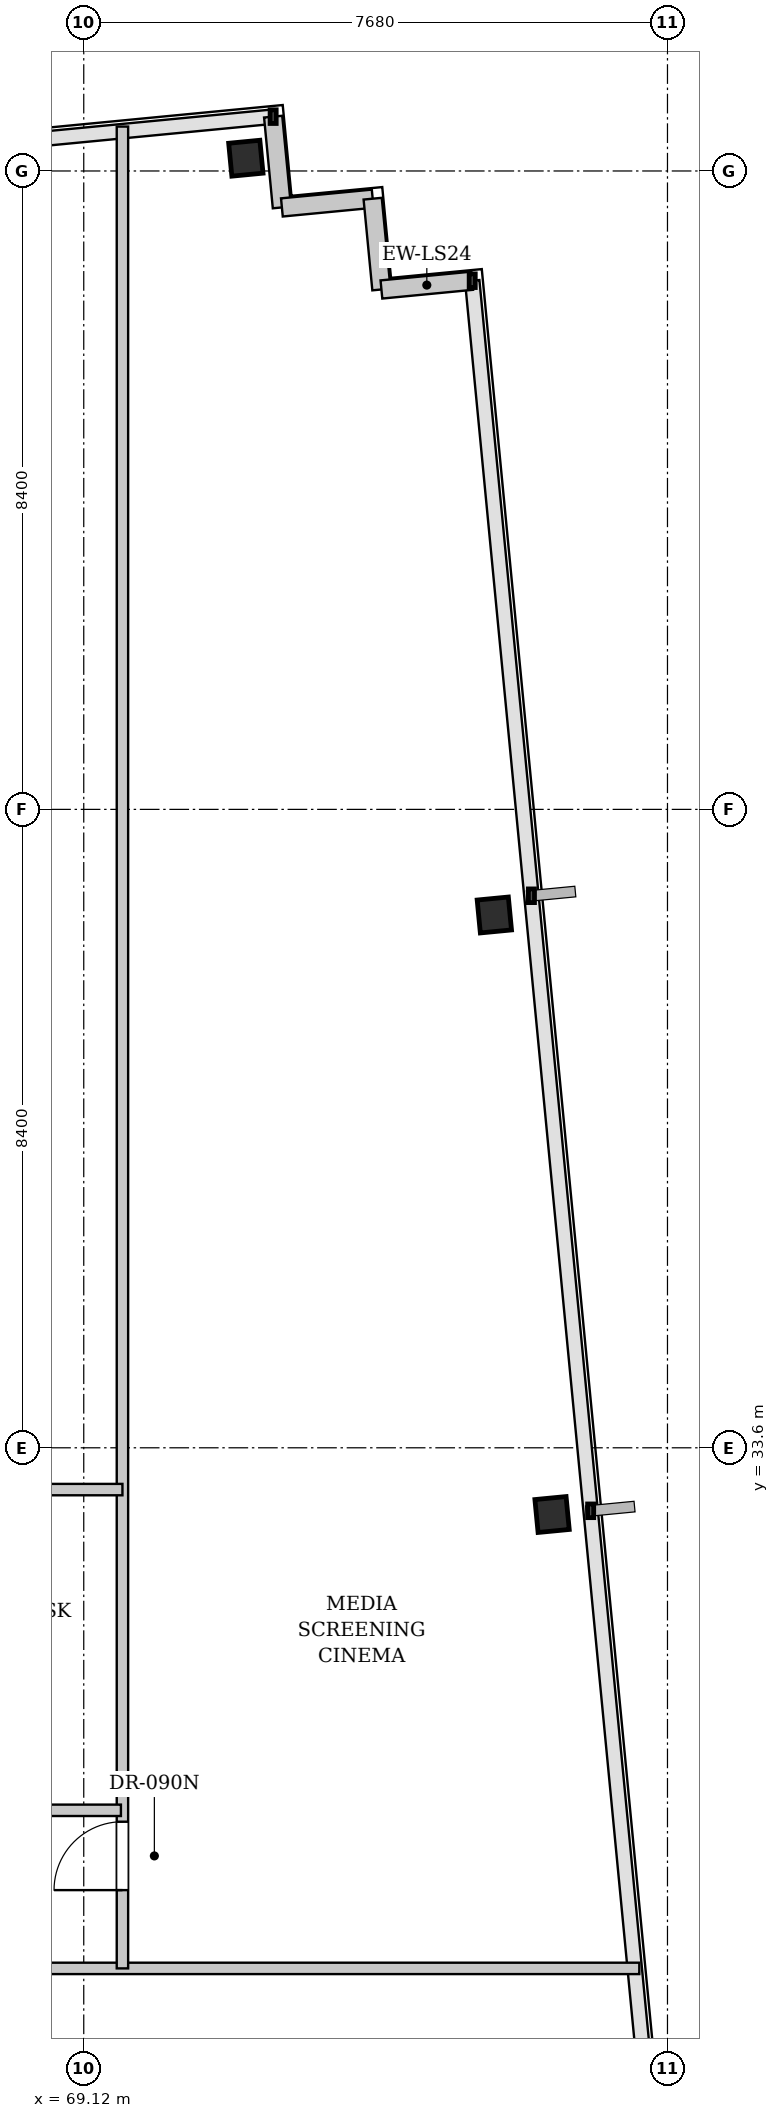
"""IFC4 building model, lengths in metres.
Left out: names, types, materials, properties, quantities, classifications, styles, units other than length and angle.
Written with IfcOpenShell. Run it as: python <this file> out.ifc"""

import sys

from ifc_helpers import new_model, si_unit, direction, frame, frame_2d, origin, origin_2d, place, context, subcontext, project, spatial, rectangle, i_section, extrude, element, fill, save


model = new_model("IFC4")
c1 = context("Model", 3, precision=1e-05, world=origin(), true_north=direction((0.0, 1.0)))
c2 = subcontext(c1, "Body", "Model", "MODEL_VIEW")
j1 = project(units=[si_unit("LENGTHUNIT", "METRE"), si_unit("PLANEANGLEUNIT", "RADIAN")], contexts=[c1])
p1 = place(None, origin())
s1 = spatial("IfcSite", under=j1, at=p1, CompositionType="ELEMENT")
p2 = place(p1, origin())
s2 = spatial("IfcBuilding", under=s1, at=p2, CompositionType="ELEMENT")
p3 = place(p2, frame((0.0, 0.0, 106.7)))
s3 = spatial("IfcBuildingStorey", under=s2, at=p3, CompositionType="ELEMENT", Elevation=106.7)
for number, where, z_axis, x_axis in (
    (1, (71.253, 50.568, 0.0), (0.0, 0.0, 1.0), (0.995, 0.096, 0.0)),
    (2, (75.282, 32.722, 0.0), (0.0, 0.0, 1.0), (0.995, 0.096, 0.0)),
    (3, (74.522, 40.611, 0.0), (0.0, 0.0, 1.0), (0.995, 0.096, 0.0)),
):
    element("IfcColumn", number, at=place(p3, frame(where, z_axis=z_axis, x_axis=x_axis)), inside=s3, PredefinedType="COLUMN", context=c2, shape_type="SweptSolid", body=[
        extrude(i_section(OverallWidth=0.412, OverallDepth=0.435, WebThickness=0.036, FlangeThickness=0.058, FilletRadius=0.015, at=origin_2d()), origin(), (0.0, 0.0, 1.0), 3.4),
    ])
for number, where, z_axis, x_axis in (
    (4, (71.612, 51.115, 0.0), (0.0, 0.0, 1.0), (0.096, -0.995, 0.0)),
    (5, (71.727, 49.92, 0.0), (0.0, 0.0, 1.0), (0.995, 0.096, 0.0)),
    (6, (72.921, 50.035, 0.0), (0.0, 0.0, 1.0), (0.096, -0.995, 0.0)),
    (7, (73.036, 48.841, 0.0), (0.0, 0.0, 1.0), (0.995, 0.096, 0.0)),
):
    element("IfcWall", number, at=place(p3, frame(where, z_axis=z_axis, x_axis=x_axis)), inside=s3, PredefinedType="SOLIDWALL", context=c2, shape_type="SweptSolid", body=[
        extrude(rectangle(XDim=1.2, YDim=0.24, at=frame_2d((0.6, 0.0))), origin(), (0.0, 0.0, 1.0), 3.18),
    ])
p4 = place(p3, frame((15.208, 26.75, 0.0), z_axis=(0.0, 0.0, 1.0), x_axis=(1.0, 0.0, 0.0)))
e8 = element("IfcWall", 8, at=p4, inside=s3, PredefinedType="PARTITIONING", context=c2, shape_type="SweptSolid", body=[
    extrude(rectangle(XDim=61.222, YDim=0.15, at=frame_2d((30.611, 0.0))), origin(), (0.0, 0.0, 1.0), 2.525),
])
p5 = place(p4, frame((9.474, 0.0, 0.0)))
e9 = element("IfcOpeningElement", 9, at=p5, cuts=e8, PredefinedType="OPENING", context=c2, shape_type="SweptSolid", body=[
    extrude(rectangle(XDim=1.0, YDim=2.15, at=frame_2d((0.5, 1.075))), frame((0.0, 0.085, 0.0), z_axis=(0.0, -1.0, 0.0), x_axis=(1.0, 0.0, 0.0)), (0.0, 0.0, 1.0), 0.17),
])
p6 = place(p4, frame((17.351, 0.0, 0.0)))
e10 = element("IfcOpeningElement", 10, at=p6, cuts=e8, PredefinedType="OPENING", context=c2, shape_type="SweptSolid", body=[
    extrude(rectangle(XDim=1.0, YDim=2.15, at=frame_2d((0.5, 1.075))), frame((0.0, 0.085, 0.0), z_axis=(0.0, -1.0, 0.0), x_axis=(1.0, 0.0, 0.0)), (0.0, 0.0, 1.0), 0.17),
])
p7 = place(p4, frame((24.736, 0.0, 0.0)))
e11 = element("IfcOpeningElement", 11, at=p7, cuts=e8, PredefinedType="OPENING", context=c2, shape_type="SweptSolid", body=[
    extrude(rectangle(XDim=1.0, YDim=2.15, at=frame_2d((0.5, 1.075))), frame((0.0, 0.085, 0.0), z_axis=(0.0, -1.0, 0.0), x_axis=(1.0, 0.0, 0.0)), (0.0, 0.0, 1.0), 0.17),
])
p8 = place(p4, frame((32.429, 0.0, 0.0)))
e12 = element("IfcOpeningElement", 12, at=p8, cuts=e8, PredefinedType="OPENING", context=c2, shape_type="SweptSolid", body=[
    extrude(rectangle(XDim=1.0, YDim=2.15, at=frame_2d((0.5, 1.075))), frame((0.0, 0.085, 0.0), z_axis=(0.0, -1.0, 0.0), x_axis=(1.0, 0.0, 0.0)), (0.0, 0.0, 1.0), 0.17),
])
p9 = place(p4, frame((35.993, 0.0, 0.0)))
e13 = element("IfcOpeningElement", 13, at=p9, cuts=e8, PredefinedType="OPENING", context=c2, shape_type="SweptSolid", body=[
    extrude(rectangle(XDim=1.0, YDim=2.15, at=frame_2d((0.5, 1.075))), frame((0.0, 0.085, 0.0), z_axis=(0.0, -1.0, 0.0), x_axis=(1.0, 0.0, 0.0)), (0.0, 0.0, 1.0), 0.17),
])
p10 = place(p4, frame((43.982, 0.0, 0.0)))
e14 = element("IfcOpeningElement", 14, at=p10, cuts=e8, PredefinedType="OPENING", context=c2, shape_type="SweptSolid", body=[
    extrude(rectangle(XDim=1.0, YDim=2.15, at=frame_2d((0.5, 1.075))), frame((0.0, 0.085, 0.0), z_axis=(0.0, -1.0, 0.0), x_axis=(1.0, 0.0, 0.0)), (0.0, 0.0, 1.0), 0.17),
])
p11 = place(p4, frame((50.267, 0.0, 0.0)))
e15 = element("IfcOpeningElement", 15, at=p11, cuts=e8, PredefinedType="OPENING", context=c2, shape_type="SweptSolid", body=[
    extrude(rectangle(XDim=1.0, YDim=2.15, at=frame_2d((0.5, 1.075))), frame((0.0, 0.085, 0.0), z_axis=(0.0, -1.0, 0.0), x_axis=(1.0, 0.0, 0.0)), (0.0, 0.0, 1.0), 0.17),
])
p12 = place(p3, frame((69.629, 26.75, 0.0), z_axis=(0.0, 0.0, 1.0), x_axis=(0.0, 1.0, 0.0)))
e16 = element("IfcWall", 16, at=p12, inside=s3, PredefinedType="PARTITIONING", context=c2, shape_type="SweptSolid", body=[
    extrude(rectangle(XDim=24.234, YDim=0.15, at=frame_2d((12.117, 0.0))), origin(), (0.0, 0.0, 1.0), 3.18),
])
p13 = place(p12, frame((1.03, 0.0, 0.0)))
e17 = element("IfcOpeningElement", 17, at=p13, cuts=e16, PredefinedType="OPENING", context=c2, shape_type="SweptSolid", body=[
    extrude(rectangle(XDim=0.9, YDim=2.15, at=frame_2d((0.45, 1.075))), frame((0.0, 0.085, 0.0), z_axis=(0.0, -1.0, 0.0), x_axis=(1.0, 0.0, 0.0)), (0.0, 0.0, 1.0), 0.17),
])
p14 = place(p3, frame((50.58, 33.05, 0.0), z_axis=(0.0, 0.0, 1.0), x_axis=(1.0, 0.0, 0.0)))
e18 = element("IfcWall", 18, at=p14, inside=s3, PredefinedType="PARTITIONING", context=c2, shape_type="SweptSolid", body=[
    extrude(rectangle(XDim=19.049, YDim=0.15, at=frame_2d((9.524, 0.0))), origin(), (0.0, 0.0, 1.0), 2.525),
])
p15 = place(p3, frame((50.59, 28.83, 0.0), z_axis=(0.0, 0.0, 1.0), x_axis=(1.0, 0.0, 0.0)))
e19 = element("IfcWall", 19, at=p15, inside=s3, PredefinedType="PARTITIONING", context=c2, shape_type="SweptSolid", body=[
    extrude(rectangle(XDim=19.019, YDim=0.15, at=frame_2d((9.509, 0.0))), origin(), (0.0, 0.0, 1.0), 2.525),
])
p16 = place(p15, frame((1.167, 0.0, 0.0)))
e20 = element("IfcOpeningElement", 20, at=p16, cuts=e19, PredefinedType="OPENING", context=c2, shape_type="SweptSolid", body=[
    extrude(rectangle(XDim=0.9, YDim=2.15, at=frame_2d((0.45, 1.075))), frame((0.0, 0.085, 0.0), z_axis=(0.0, -1.0, 0.0), x_axis=(1.0, 0.0, 0.0)), (0.0, 0.0, 1.0), 0.17),
])
p17 = place(p15, frame((5.065, 0.0, 0.0)))
e21 = element("IfcOpeningElement", 21, at=p17, cuts=e19, PredefinedType="OPENING", context=c2, shape_type="SweptSolid", body=[
    extrude(rectangle(XDim=0.9, YDim=2.15, at=frame_2d((0.45, 1.075))), frame((0.0, 0.085, 0.0), z_axis=(0.0, -1.0, 0.0), x_axis=(1.0, 0.0, 0.0)), (0.0, 0.0, 1.0), 0.17),
])
p18 = place(p15, frame((10.296, 0.0, 0.0)))
e22 = element("IfcOpeningElement", 22, at=p18, cuts=e19, PredefinedType="OPENING", context=c2, shape_type="SweptSolid", body=[
    extrude(rectangle(XDim=0.9, YDim=2.15, at=frame_2d((0.45, 1.075))), frame((0.0, 0.085, 0.0), z_axis=(0.0, -1.0, 0.0), x_axis=(1.0, 0.0, 0.0)), (0.0, 0.0, 1.0), 0.17),
])
p19 = place(p15, frame((15.906, 0.0, 0.0)))
e23 = element("IfcOpeningElement", 23, at=p19, cuts=e19, PredefinedType="OPENING", context=c2, shape_type="SweptSolid", body=[
    extrude(rectangle(XDim=0.9, YDim=2.15, at=frame_2d((0.45, 1.075))), frame((0.0, 0.085, 0.0), z_axis=(0.0, -1.0, 0.0), x_axis=(1.0, 0.0, 0.0)), (0.0, 0.0, 1.0), 0.17),
])
p20 = place(p13, origin())
e24 = element("IfcDoor", 24, at=p20, inside=s3, OperationType="SINGLE_SWING_LEFT", PredefinedType="DOOR", context=c2, shape_type="SweptSolid", body=[
    extrude(rectangle(XDim=0.9, YDim=2.15, at=frame_2d((0.45, 1.075))), frame((0.0, 0.025, 0.0), z_axis=(0.0, -1.0, 0.0), x_axis=(1.0, 0.0, 0.0)), (0.0, 0.0, 1.0), 0.05),
])
fill(e17, e24)
save(model, sys.argv[1])
